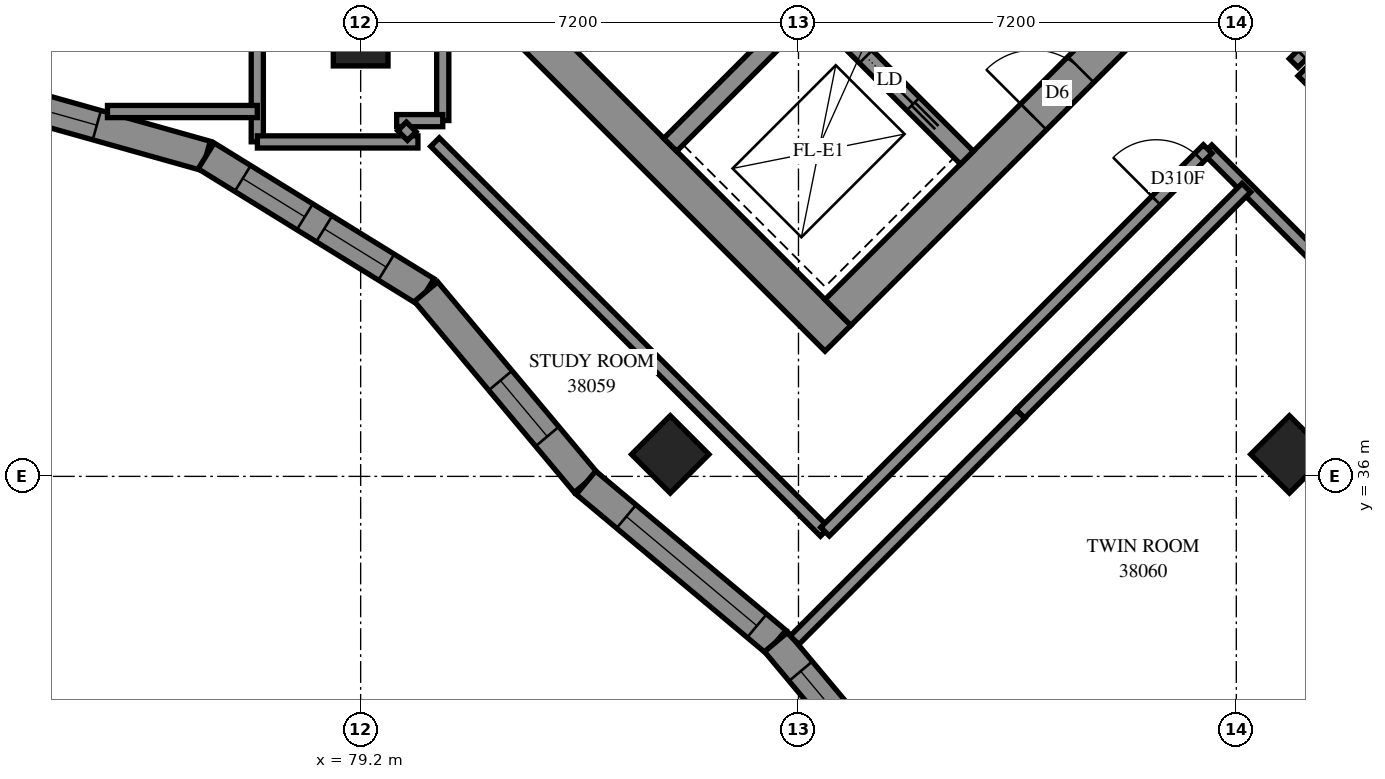
"""IFC4 building model, lengths in metres.
Left out: names, types, materials, properties, quantities, classifications, styles, units other than length and angle.
Written with IfcOpenShell. Run it as: python <this file> out.ifc"""

import sys

from ifc_helpers import new_model, si_unit, direction, frame, frame_2d, origin, origin_2d, place, context, subcontext, project, spatial, polyline, rectangle, outline, extrude, element, fill, save


model = new_model("IFC4")
c1 = context("Model", 3, precision=1e-05, world=origin(), true_north=direction((0.0, 1.0)))
c2 = subcontext(c1, "Body", "Model", "MODEL_VIEW")
j1 = project(units=[si_unit("LENGTHUNIT", "METRE"), si_unit("PLANEANGLEUNIT", "RADIAN")], contexts=[c1])
p1 = place(None, origin())
s1 = spatial("IfcSite", under=j1, at=p1, CompositionType="ELEMENT")
p2 = place(p1, origin())
s2 = spatial("IfcBuilding", under=s1, at=p2, CompositionType="ELEMENT")
p3 = place(p2, frame((0.0, 0.0, 142.2)))
s3 = spatial("IfcBuildingStorey", under=s2, at=p3, CompositionType="ELEMENT", Elevation=142.2)
for number, where, z_axis, x_axis in (
    (1, (79.2, 43.2, 0.0), (0.0, 0.0, 1.0), (1.0, 0.0, 0.0)),
    (2, (84.291, 36.362, 0.0), (0.0, 0.0, 1.0), (0.707, -0.707, 0.0)),
    (3, (94.474, 36.362, 0.0), (0.0, 0.0, 1.0), (0.707, -0.707, 0.0)),
):
    element("IfcColumn", number, at=place(p3, frame(where, z_axis=z_axis, x_axis=x_axis)), inside=s3, PredefinedType="COLUMN", context=c2, shape_type="SweptSolid", body=[
        extrude(rectangle(XDim=0.9, YDim=0.9, at=origin_2d()), origin(), (0.0, 0.0, 1.0), 3.1),
    ])
p4 = place(p3, frame((76.018, 49.302, -0.3), z_axis=(0.0, 0.0, 1.0), x_axis=(0.7071067812, -0.7071067812, 0.0)))
e4 = element("IfcWall", 4, at=p4, inside=s3, PredefinedType="SHEAR", context=c2, shape_type="SweptSolid", body=[
    extrude(rectangle(XDim=15.6, YDim=0.6, at=frame_2d((7.8, 0.0))), origin(), (0.0, 0.0, 1.0), 2.7),
])
p5 = place(p3, frame((87.049, 38.695, -0.3), z_axis=(0.0, 0.0, 1.0), x_axis=(0.7071067812, 0.7071067812, 0.0)))
e5 = element("IfcWall", 5, at=p5, inside=s3, PredefinedType="SHEAR", context=c2, shape_type="SweptSolid", body=[
    extrude(rectangle(XDim=14.4, YDim=0.6, at=frame_2d((7.2, 0.0))), origin(), (0.0, 0.0, 1.0), 2.7),
])
p6 = place(p5, frame((4.55, 0.0, 0.3)))
e6 = element("IfcOpeningElement", 6, at=p6, cuts=e5, PredefinedType="OPENING", context=c2, shape_type="SweptSolid", body=[
    extrude(rectangle(XDim=1.1, YDim=2.1, at=frame_2d((0.55, 1.05))), frame((0.0, 0.31, 0.0), z_axis=(0.0, -1.0, 0.0), x_axis=(1.0, 0.0, 0.0)), (0.0, 0.0, 1.0), 0.62),
])
p7 = place(p5, frame((11.35, 0.0, 0.3)))
e7 = element("IfcOpeningElement", 7, at=p7, cuts=e5, PredefinedType="OPENING", context=c2, shape_type="SweptSolid", body=[
    extrude(rectangle(XDim=1.1, YDim=2.1, at=frame_2d((0.55, 1.05))), frame((0.0, 0.31, 0.0), z_axis=(0.0, -1.0, 0.0), x_axis=(1.0, 0.0, 0.0)), (0.0, 0.0, 1.0), 0.62),
])
p8 = place(p3, frame((84.291, 41.453, 0.0), z_axis=(0.0, 0.0, 1.0), x_axis=(0.7071067812, 0.7071067812, 0.0)))
e8 = element("IfcWall", 8, at=p8, inside=s3, PredefinedType="SOLIDWALL", context=c2, shape_type="SweptSolid", body=[
    extrude(rectangle(XDim=3.3, YDim=0.3, at=frame_2d((1.65, 0.0))), origin(), (0.0, 0.0, 1.0), 3.1),
])
p9 = place(p3, frame((78.988, 51.423, 0.0), z_axis=(0.0, 0.0, 1.0), x_axis=(0.7071067812, -0.7071067812, 0.0)))
e9 = element("IfcWall", 9, at=p9, inside=s3, PredefinedType="SOLIDWALL", context=c2, shape_type="SweptSolid", body=[
    extrude(rectangle(XDim=14.4, YDim=0.3, at=frame_2d((7.2, 0.0))), origin(), (0.0, 0.0, 1.0), 3.1),
])
p10 = place(p9, frame((1.35, 0.0, 0.0)))
e10 = element("IfcOpeningElement", 10, at=p10, cuts=e9, PredefinedType="OPENING", context=c2, shape_type="SweptSolid", body=[
    extrude(rectangle(XDim=0.9, YDim=2.1, at=frame_2d((0.45, 1.05))), frame((0.0, 0.16, 0.0), z_axis=(0.0, -1.0, 0.0), x_axis=(1.0, 0.0, 0.0)), (0.0, 0.0, 1.0), 0.32),
])
p11 = place(p9, frame((4.95, 0.0, 0.0)))
e11 = element("IfcOpeningElement", 11, at=p11, cuts=e9, PredefinedType="OPENING", context=c2, shape_type="SweptSolid", body=[
    extrude(rectangle(XDim=0.9, YDim=2.1, at=frame_2d((0.45, 1.05))), frame((0.0, 0.16, 0.0), z_axis=(0.0, -1.0, 0.0), x_axis=(1.0, 0.0, 0.0)), (0.0, 0.0, 1.0), 0.32),
])
p12 = place(p9, frame((8.55, 0.0, 0.0)))
e12 = element("IfcOpeningElement", 12, at=p12, cuts=e9, PredefinedType="OPENING", context=c2, shape_type="SweptSolid", body=[
    extrude(rectangle(XDim=0.9, YDim=2.1, at=frame_2d((0.45, 1.05))), frame((0.0, 0.16, 0.0), z_axis=(0.0, -1.0, 0.0), x_axis=(1.0, 0.0, 0.0)), (0.0, 0.0, 1.0), 0.32),
])
p13 = place(p9, frame((12.05, 0.0, 0.0)))
e13 = element("IfcOpeningElement", 13, at=p13, cuts=e9, PredefinedType="OPENING", context=c2, shape_type="SweptSolid", body=[
    extrude(rectangle(XDim=1.1, YDim=2.1, at=frame_2d((0.55, 1.05))), frame((0.0, 0.16, 0.0), z_axis=(0.0, -1.0, 0.0), x_axis=(1.0, 0.0, 0.0)), (0.0, 0.0, 1.0), 0.32),
])
p14 = place(p3, frame((73.16, 42.254, 0.0), z_axis=(0.0, 0.0, 1.0), x_axis=(0.9627076036, -0.2705440261, 0.0)))
e14 = element("IfcWall", 14, at=p14, inside=s3, PredefinedType="SOLIDWALL", context=c2, shape_type="SweptSolid", body=[
    extrude(outline(polyline([(0.048, -0.25), (3.6, -0.25), (3.67, 0.25), (-0.048, 0.25), (0.048, -0.25)])), origin(), (0.0, 0.0, 1.0), 3.1),
])
p15 = place(p14, frame((0.568, 0.0, 0.45)))
e15 = element("IfcOpeningElement", 15, at=p15, cuts=e14, PredefinedType="OPENING", context=c2, shape_type="SweptSolid", body=[
    extrude(rectangle(XDim=1.2, YDim=2.5, at=frame_2d((0.6, 1.25))), frame((0.0, 0.26, 0.0), z_axis=(0.0, -1.0, 0.0), x_axis=(1.0, 0.0, 0.0)), (0.0, 0.0, 1.0), 0.52),
])
p16 = place(p3, frame((76.659, 41.27, 0.0), z_axis=(0.0, 0.0, 1.0), x_axis=(0.8508843037, -0.5253531209, 0.0)))
e16 = element("IfcWall", 16, at=p16, inside=s3, PredefinedType="SOLIDWALL", context=c2, shape_type="SweptSolid", body=[
    extrude(outline(polyline([(0.035, -0.25), (4.21, -0.25), (4.291, 0.25), (-0.035, 0.25), (0.035, -0.25)])), origin(), (0.0, 0.0, 1.0), 3.1),
])
p17 = place(p16, frame((0.707, 0.0, 0.45)))
e17 = element("IfcOpeningElement", 17, at=p17, cuts=e16, PredefinedType="OPENING", context=c2, shape_type="SweptSolid", body=[
    extrude(rectangle(XDim=1.2, YDim=2.5, at=frame_2d((0.6, 1.25))), frame((0.0, 0.26, 0.0), z_axis=(0.0, -1.0, 0.0), x_axis=(1.0, 0.0, 0.0)), (0.0, 0.0, 1.0), 0.52),
])
p18 = place(p16, frame((2.282, 0.0, 0.45)))
e18 = element("IfcOpeningElement", 18, at=p18, cuts=e16, PredefinedType="OPENING", context=c2, shape_type="SweptSolid", body=[
    extrude(rectangle(XDim=1.2, YDim=2.5, at=frame_2d((0.6, 1.25))), frame((0.0, 0.26, 0.0), z_axis=(0.0, -1.0, 0.0), x_axis=(1.0, 0.0, 0.0)), (0.0, 0.0, 1.0), 0.52),
])
p19 = place(p3, frame((80.276, 39.037, 0.0), z_axis=(0.0, 0.0, 1.0), x_axis=(0.6417604293, -0.7669051776, 0.0)))
e19 = element("IfcWall", 19, at=p19, inside=s3, PredefinedType="SOLIDWALL", context=c2, shape_type="SweptSolid", body=[
    extrude(outline(polyline([(0.041, -0.25), (4.119, -0.25), (4.075, 0.25), (-0.041, 0.25), (0.041, -0.25)])), origin(), (0.0, 0.0, 1.0), 3.1),
])
p20 = place(p19, frame((1.905, 0.0, 0.45)))
e20 = element("IfcOpeningElement", 20, at=p20, cuts=e19, PredefinedType="OPENING", context=c2, shape_type="SweptSolid", body=[
    extrude(rectangle(XDim=1.2, YDim=2.5, at=frame_2d((0.6, 1.25))), frame((0.0, 0.26, 0.0), z_axis=(0.0, -1.0, 0.0), x_axis=(1.0, 0.0, 0.0)), (0.0, 0.0, 1.0), 0.52),
])
p21 = place(p3, frame((82.905, 35.895, 0.0), z_axis=(0.0, 0.0, 1.0), x_axis=(0.7669033121, -0.6417626585, 0.0)))
e21 = element("IfcWall", 21, at=p21, inside=s3, PredefinedType="SOLIDWALL", context=c2, shape_type="SweptSolid", body=[
    extrude(outline(polyline([(-0.022, -0.25), (4.056, -0.25), (4.101, 0.25), (0.022, 0.25), (-0.022, -0.25)])), origin(), (0.0, 0.0, 1.0), 3.1),
])
p22 = place(p21, frame((0.866, 0.0, 0.45)))
e22 = element("IfcOpeningElement", 22, at=p22, cuts=e21, PredefinedType="OPENING", context=c2, shape_type="SweptSolid", body=[
    extrude(rectangle(XDim=2.8, YDim=2.5, at=frame_2d((1.4, 1.25))), frame((0.0, 0.26, 0.0), z_axis=(0.0, -1.0, 0.0), x_axis=(1.0, 0.0, 0.0)), (0.0, 0.0, 1.0), 0.52),
])
p23 = place(p3, frame((86.033, 33.278, 0.0), z_axis=(0.0, 0.0, 1.0), x_axis=(0.641748238, -0.7669153793, 0.0)))
e23 = element("IfcWall", 23, at=p23, inside=s3, PredefinedType="SOLIDWALL", context=c2, shape_type="SweptSolid", body=[
    extrude(outline(polyline([(0.022, -0.25), (4.101, -0.25), (4.056, 0.25), (-0.022, 0.25), (0.022, -0.25)])), origin(), (0.0, 0.0, 1.0), 3.1),
])
p24 = place(p23, frame((0.628, 0.0, 0.45)))
e24 = element("IfcOpeningElement", 24, at=p24, cuts=e23, PredefinedType="OPENING", context=c2, shape_type="SweptSolid", body=[
    extrude(rectangle(XDim=2.8, YDim=2.5, at=frame_2d((1.4, 1.25))), frame((0.0, 0.26, 0.0), z_axis=(0.0, -1.0, 0.0), x_axis=(1.0, 0.0, 0.0)), (0.0, 0.0, 1.0), 0.52),
])
p25 = place(p3, frame((93.127, 41.379, 0.0), z_axis=(0.0, 0.0, 1.0), x_axis=(0.7071067812, -0.7071067812, 0.0)))
e25 = element("IfcWall", 25, at=p25, inside=s3, PredefinedType="PARTITIONING", context=c2, shape_type="SweptSolid", body=[
    extrude(rectangle(XDim=9.39, YDim=0.2, at=frame_2d((4.695, 0.0))), origin(), (0.0, 0.0, 1.0), 3.1),
])
p26 = place(p25, frame((3.2, 0.0, 0.0)))
e26 = element("IfcOpeningElement", 26, at=p26, cuts=e25, PredefinedType="OPENING", context=c2, shape_type="SweptSolid", body=[
    extrude(rectangle(XDim=0.9, YDim=2.1, at=frame_2d((0.45, 1.05))), frame((0.0, 0.11, 0.0), z_axis=(0.0, -1.0, 0.0), x_axis=(1.0, 0.0, 0.0)), (0.0, 0.0, 1.0), 0.22),
])
p27 = place(p3, frame((80.423, 41.497, 0.0), z_axis=(0.0, 0.0, 1.0), x_axis=(0.7071067812, -0.7071067812, 0.0)))
e27 = element("IfcWall", 27, at=p27, inside=s3, PredefinedType="PARTITIONING", context=c2, shape_type="SweptSolid", body=[
    extrude(rectangle(XDim=9.065, YDim=0.2, at=frame_2d((4.532, 0.0))), origin(), (0.0, 0.0, 1.0), 3.1),
])
p28 = place(p3, frame((94.543, 42.797, 0.0), z_axis=(0.0, 0.0, 1.0), x_axis=(0.7071067812, 0.7071067812, 0.0)))
e28 = element("IfcWall", 28, at=p28, inside=s3, PredefinedType="PARTITIONING", context=c2, shape_type="SweptSolid", body=[
    extrude(rectangle(XDim=8.901, YDim=0.2, at=frame_2d((4.45, 0.0))), origin(), (0.0, 0.0, 1.0), 3.1),
])
p29 = place(p28, frame((0.193, 0.0, 0.0)))
e29 = element("IfcOpeningElement", 29, at=p29, cuts=e28, PredefinedType="OPENING", context=c2, shape_type="SweptSolid", body=[
    extrude(rectangle(XDim=1.0, YDim=2.1, at=frame_2d((0.5, 1.05))), frame((0.0, 0.11, 0.0), z_axis=(0.0, -1.0, 0.0), x_axis=(1.0, 0.0, 0.0)), (0.0, 0.0, 1.0), 0.22),
])
p30 = place(p3, frame((86.837, 35.091, 0.0), z_axis=(0.0, 0.0, 1.0), x_axis=(0.7071067812, 0.7071067812, 0.0)))
e30 = element("IfcWall", 30, at=p30, inside=s3, PredefinedType="PARTITIONING", context=c2, shape_type="SweptSolid", body=[
    extrude(rectangle(XDim=8.898, YDim=0.2, at=frame_2d((4.449, 0.0))), origin(), (0.0, 0.0, 1.0), 3.1),
])
p31 = place(p30, frame((7.7, 0.0, 0.0)))
e31 = element("IfcOpeningElement", 31, at=p31, cuts=e30, PredefinedType="OPENING", context=c2, shape_type="SweptSolid", body=[
    extrude(rectangle(XDim=1.0, YDim=2.1, at=frame_2d((0.5, 1.05))), frame((0.0, 0.11, 0.0), z_axis=(0.0, -1.0, 0.0), x_axis=(1.0, 0.0, 0.0)), (0.0, 0.0, 1.0), 0.22),
])
p32 = place(p3, frame((91.387, 28.186, 0.0), z_axis=(0.0, 0.0, 1.0), x_axis=(0.7071067812, 0.7071067812, 0.0)))
e32 = element("IfcWall", 32, at=p32, inside=s3, PredefinedType="PARTITIONING", context=c2, shape_type="SweptSolid", body=[
    extrude(rectangle(XDim=8.164, YDim=0.2, at=frame_2d((4.082, 0.0))), origin(), (0.0, 0.0, 1.0), 3.1),
])
p33 = place(p3, frame((90.047, 37.029, 0.0), z_axis=(0.0, 0.0, 1.0), x_axis=(0.7071067812, 0.7071067812, 0.0)))
e33 = element("IfcWall", 33, at=p33, inside=s3, PredefinedType="PARTITIONING", context=c2, shape_type="SweptSolid", body=[
    extrude(rectangle(XDim=5.258, YDim=0.2, at=frame_2d((2.629, 0.0))), origin(), (0.0, 0.0, 1.0), 3.1),
])
p34 = place(p3, frame((86.335, 33.306, 0.0), z_axis=(0.0, 0.0, 1.0), x_axis=(0.7069165351, 0.7072969761, 0.0)))
e34 = element("IfcWall", 34, at=p34, inside=s3, PredefinedType="PARTITIONING", context=c2, shape_type="SweptSolid", body=[
    extrude(rectangle(XDim=5.257, YDim=0.2, at=frame_2d((2.629, 0.0))), origin(), (0.0, 0.0, 1.0), 3.1),
])
for number, where, z_axis, x_axis in (
    (35, (77.5, 41.502, 0.0), (0.0, 0.0, 1.0), (0.0, 1.0, 0.0)),
    (36, (77.502, 41.5, 0.0), (0.0, 0.0, 1.0), (1.0, 0.0, 0.0)),
):
    element("IfcWall", number, at=place(p3, frame(where, z_axis=z_axis, x_axis=x_axis)), inside=s3, PredefinedType="PARTITIONING", context=c2, shape_type="SweptSolid", body=[
        extrude(rectangle(XDim=2.64, YDim=0.2, at=frame_2d((1.32, 0.0))), origin(), (0.0, 0.0, 1.0), 3.1),
    ])
p35 = place(p3, frame((75.036, 42.0, 0.0), z_axis=(0.0, 0.0, 1.0), x_axis=(1.0, 0.0, 0.0)))
e37 = element("IfcWall", 37, at=p35, inside=s3, PredefinedType="PARTITIONING", context=c2, shape_type="SweptSolid", body=[
    extrude(rectangle(XDim=2.464, YDim=0.2, at=frame_2d((1.232, 0.0))), origin(), (0.0, 0.0, 1.0), 3.1),
])
p36 = place(p3, frame((80.55, 41.852, 0.0), z_axis=(0.0, 0.0, 1.0), x_axis=(0.0, 1.0, 0.0)))
e38 = element("IfcWall", 38, at=p36, inside=s3, PredefinedType="PARTITIONING", context=c2, shape_type="SweptSolid", body=[
    extrude(rectangle(XDim=2.38, YDim=0.2, at=frame_2d((1.19, 0.0))), origin(), (0.0, 0.0, 1.0), 3.1),
])
p37 = place(p3, frame((79.792, 41.85, 0.0), z_axis=(0.0, 0.0, 1.0), x_axis=(1.0, 0.0, 0.0)))
e39 = element("IfcWall", 39, at=p37, inside=s3, PredefinedType="PARTITIONING", context=c2, shape_type="SweptSolid", body=[
    extrude(rectangle(XDim=0.758, YDim=0.2, at=frame_2d((0.379, 0.0))), origin(), (0.0, 0.0, 1.0), 3.1),
])
p38 = place(p3, frame((94.686, 42.656, 0.0), z_axis=(0.0, 0.0, 1.0), x_axis=(0.7056768426, -0.7085338339, 0.0)))
e40 = element("IfcWall", 40, at=p38, inside=s3, PredefinedType="PARTITIONING", context=c2, shape_type="SweptSolid", body=[
    extrude(rectangle(XDim=0.7, YDim=0.2, at=frame_2d((0.35, 0.0))), origin(), (0.0, 0.0, 1.0), 3.1),
])
p39 = place(p3, frame((79.881, 41.755, 0.0), z_axis=(0.0, 0.0, 1.0), x_axis=(0.7071067812, -0.7071067812, 0.0)))
e41 = element("IfcWall", 41, at=p39, inside=s3, PredefinedType="PARTITIONING", context=c2, shape_type="SweptSolid", body=[
    extrude(rectangle(XDim=0.225, YDim=0.2, at=frame_2d((0.113, 0.0))), origin(), (0.0, 0.0, 1.0), 3.1),
])
p40 = place(p15, origin())
e42 = element("IfcWindow", 42, at=p40, inside=s3, PartitioningType="SINGLE_PANEL", PredefinedType="WINDOW", context=c2, shape_type="SweptSolid", body=[
    extrude(rectangle(XDim=1.2, YDim=2.5, at=frame_2d((0.6, 1.25))), frame((0.0, 0.18, 0.0), z_axis=(0.0, -1.0, 0.0), x_axis=(1.0, 0.0, 0.0)), (0.0, 0.0, 1.0), 0.06),
])
fill(e15, e42)
p41 = place(p17, origin())
e43 = element("IfcWindow", 43, at=p41, inside=s3, PartitioningType="SINGLE_PANEL", PredefinedType="WINDOW", context=c2, shape_type="SweptSolid", body=[
    extrude(rectangle(XDim=1.2, YDim=2.5, at=frame_2d((0.6, 1.25))), frame((0.0, 0.18, 0.0), z_axis=(0.0, -1.0, 0.0), x_axis=(1.0, 0.0, 0.0)), (0.0, 0.0, 1.0), 0.06),
])
fill(e17, e43)
p42 = place(p18, origin())
e44 = element("IfcWindow", 44, at=p42, inside=s3, PartitioningType="SINGLE_PANEL", PredefinedType="WINDOW", context=c2, shape_type="SweptSolid", body=[
    extrude(rectangle(XDim=1.2, YDim=2.5, at=frame_2d((0.6, 1.25))), frame((0.0, 0.18, 0.0), z_axis=(0.0, -1.0, 0.0), x_axis=(1.0, 0.0, 0.0)), (0.0, 0.0, 1.0), 0.06),
])
fill(e18, e44)
p43 = place(p20, origin())
e45 = element("IfcWindow", 45, at=p43, inside=s3, PartitioningType="SINGLE_PANEL", PredefinedType="WINDOW", context=c2, shape_type="SweptSolid", body=[
    extrude(rectangle(XDim=1.2, YDim=2.5, at=frame_2d((0.6, 1.25))), frame((0.0, 0.18, 0.0), z_axis=(0.0, -1.0, 0.0), x_axis=(1.0, 0.0, 0.0)), (0.0, 0.0, 1.0), 0.06),
])
fill(e20, e45)
p44 = place(p22, origin())
e46 = element("IfcWindow", 46, at=p44, inside=s3, PartitioningType="SINGLE_PANEL", PredefinedType="WINDOW", context=c2, shape_type="SweptSolid", body=[
    extrude(rectangle(XDim=2.8, YDim=2.5, at=frame_2d((1.4, 1.25))), frame((0.0, 0.18, 0.0), z_axis=(0.0, -1.0, 0.0), x_axis=(1.0, 0.0, 0.0)), (0.0, 0.0, 1.0), 0.06),
])
fill(e22, e46)
p45 = place(p24, origin())
e47 = element("IfcWindow", 47, at=p45, inside=s3, PartitioningType="SINGLE_PANEL", PredefinedType="WINDOW", context=c2, shape_type="SweptSolid", body=[
    extrude(rectangle(XDim=2.8, YDim=2.5, at=frame_2d((1.4, 1.25))), frame((0.0, 0.18, 0.0), z_axis=(0.0, -1.0, 0.0), x_axis=(1.0, 0.0, 0.0)), (0.0, 0.0, 1.0), 0.06),
])
fill(e24, e47)
p46 = place(p6, origin())
e48 = element("IfcDoor", 48, at=p46, inside=s3, OperationType="DOUBLE_DOOR_SINGLE_SWING", PredefinedType="DOOR", context=c2, shape_type="SweptSolid", body=[
    extrude(rectangle(XDim=1.1, YDim=2.1, at=frame_2d((0.55, 1.05))), frame((0.0, 0.025, 0.0), z_axis=(0.0, -1.0, 0.0), x_axis=(1.0, 0.0, 0.0)), (0.0, 0.0, 1.0), 0.05),
])
fill(e6, e48)
p47 = place(p13, origin())
e49 = element("IfcDoor", 49, at=p47, inside=s3, OperationType="SLIDING_TO_RIGHT", PredefinedType="DOOR", context=c2, shape_type="SweptSolid", body=[
    extrude(rectangle(XDim=1.1, YDim=2.1, at=frame_2d((0.55, 1.05))), frame((0.0, 0.025, 0.0), z_axis=(0.0, -1.0, 0.0), x_axis=(1.0, 0.0, 0.0)), (0.0, 0.0, 1.0), 0.05),
])
fill(e13, e49)
p48 = place(p29, origin())
e50 = element("IfcDoor", 50, at=p48, inside=s3, OperationType="SINGLE_SWING_LEFT", PredefinedType="DOOR", context=c2, shape_type="SweptSolid", body=[
    extrude(rectangle(XDim=1.0, YDim=2.1, at=frame_2d((0.5, 1.05))), frame((0.0, 0.025, 0.0), z_axis=(0.0, -1.0, 0.0), x_axis=(1.0, 0.0, 0.0)), (0.0, 0.0, 1.0), 0.05),
])
fill(e29, e50)
p49 = place(p31, origin())
e51 = element("IfcDoor", 51, at=p49, inside=s3, OperationType="SINGLE_SWING_LEFT", PredefinedType="DOOR", context=c2, shape_type="SweptSolid", body=[
    extrude(rectangle(XDim=1.0, YDim=2.1, at=frame_2d((0.5, 1.05))), frame((0.0, 0.025, 0.0), z_axis=(0.0, -1.0, 0.0), x_axis=(1.0, 0.0, 0.0)), (0.0, 0.0, 1.0), 0.05),
])
fill(e31, e51)
save(model, sys.argv[1])
